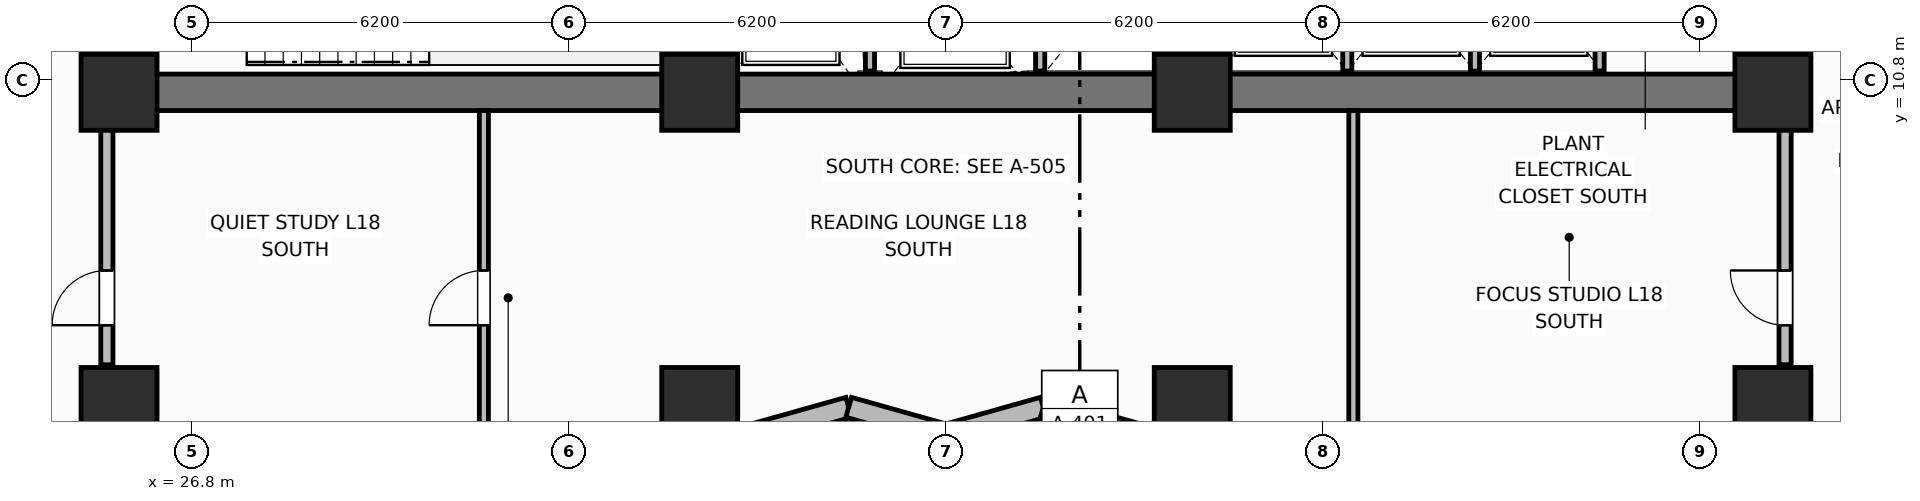
"""IFC4 building model, lengths in metres.
Left out: names, types, materials, properties, quantities, classifications, styles, units other than length and angle.
Written with IfcOpenShell. Run it as: python <this file> out.ifc"""

import sys

from ifc_helpers import new_model, si_unit, direction, frame, frame_2d, origin, origin_2d, place, context, subcontext, project, spatial, rectangle, extrude, element, fill, save


model = new_model("IFC4")
c1 = context("Model", 3, precision=1e-05, world=origin(), true_north=direction((0.0, 1.0)))
c2 = subcontext(c1, "Body", "Model", "MODEL_VIEW")
j1 = project(units=[si_unit("LENGTHUNIT", "METRE"), si_unit("PLANEANGLEUNIT", "RADIAN")], contexts=[c1])
p1 = place(None, origin())
s1 = spatial("IfcSite", under=j1, at=p1, CompositionType="ELEMENT")
p2 = place(p1, origin())
s2 = spatial("IfcBuilding", under=s1, at=p2, CompositionType="ELEMENT")
p3 = place(p2, frame((0.0, 0.0, 73.2)))
s3 = spatial("IfcBuildingStorey", under=s2, at=p3, CompositionType="ELEMENT", Elevation=73.2)
p4 = place(p3, frame((52.8, 10.6, 0.0), z_axis=(0.0, 0.0, 1.0), x_axis=(-1.0, 0.0, 0.0)))
e1 = element("IfcWall", 1, at=p4, inside=s3, PredefinedType="SHEAR", context=c2, shape_type="SweptSolid", body=[
    extrude(rectangle(XDim=27.2, YDim=0.6, at=frame_2d((13.6, 0.0))), origin(), (0.0, 0.0, 1.0), 3.7),
])
for number, where, z_axis, x_axis in (
    (2, (25.6, 10.9, 0.0), (0.0, 0.0, 1.0), (0.0, 1.0, 0.0)),
    (3, (52.8, 10.9, 0.0), (0.0, 0.0, 1.0), (0.0, 1.0, 0.0)),
):
    element("IfcWall", number, at=place(p3, frame(where, z_axis=z_axis, x_axis=x_axis)), inside=s3, PredefinedType="SHEAR", context=c2, shape_type="SweptSolid", body=[
        extrude(rectangle(XDim=5.6, YDim=0.6, at=frame_2d((2.8, 0.0))), origin(), (0.0, 0.0, 1.0), 3.7),
    ])
for number, where, z_axis, x_axis in (
    (4, (35.15, 10.9, 0.0), (0.0, 0.0, 1.0), (0.0, 1.0, 0.0)),
    (5, (43.25, 10.9, 0.0), (0.0, 0.0, 1.0), (0.0, 1.0, 0.0)),
):
    element("IfcWall", number, at=place(p3, frame(where, z_axis=z_axis, x_axis=x_axis)), inside=s3, PredefinedType="SHEAR", context=c2, shape_type="SweptSolid", body=[
        extrude(rectangle(XDim=5.6, YDim=0.4, at=frame_2d((2.8, 0.0))), origin(), (0.0, 0.0, 1.0), 3.7),
    ])
for number, where, z_axis, x_axis in (
    (6, (25.6, 10.6, 0.0), (0.0, 0.0, 1.0), (1.0, 0.0, 0.0)),
    (7, (35.15, 10.6, 0.0), (0.0, 0.0, 1.0), (1.0, 0.0, 0.0)),
    (8, (43.25, 10.6, 0.0), (0.0, 0.0, 1.0), (1.0, 0.0, 0.0)),
    (9, (52.8, 10.6, 0.0), (0.0, 0.0, 1.0), (1.0, 0.0, 0.0)),
    (10, (25.6, 5.45, 0.0), (0.0, 0.0, 1.0), (1.0, 0.0, 0.0)),
    (11, (35.15, 5.45, 0.0), (0.0, 0.0, 1.0), (1.0, 0.0, 0.0)),
    (12, (43.25, 5.45, 0.0), (0.0, 0.0, 1.0), (1.0, 0.0, 0.0)),
    (13, (52.8, 5.45, 0.0), (0.0, 0.0, 1.0), (1.0, 0.0, 0.0)),
):
    element("IfcColumn", number, at=place(p3, frame(where, z_axis=z_axis, x_axis=x_axis)), inside=s3, PredefinedType="COLUMN", context=c2, shape_type="SweptSolid", body=[
        extrude(rectangle(XDim=1.25, YDim=1.25, at=origin_2d()), origin(), (0.0, 0.0, 1.0), 3.7),
    ])
p5 = place(p3, frame((36.0, 4.97, 0.0), z_axis=(0.0, 0.0, 1.0), x_axis=(0.962662902433, 0.270703040766, 0.0)))
e14 = element("IfcWall", 14, at=p5, inside=s3, PredefinedType="SOLIDWALL", context=c2, shape_type="SweptSolid", body=[
    extrude(rectangle(XDim=1.662, YDim=0.34, at=frame_2d((0.831, 0.0))), origin(), (0.0, 0.0, 1.0), 2.66),
])
p6 = place(p3, frame((37.6, 5.42, 0.0), z_axis=(0.0, 0.0, 1.0), x_axis=(0.962652136636, -0.270741322725, 0.0)))
e15 = element("IfcWall", 15, at=p6, inside=s3, PredefinedType="SOLIDWALL", context=c2, shape_type="SweptSolid", body=[
    extrude(rectangle(XDim=1.662, YDim=0.34, at=frame_2d((0.831, 0.0))), origin(), (0.0, 0.0, 1.0), 2.66),
])
p7 = place(p3, frame((39.2, 4.97, 0.0), z_axis=(0.0, 0.0, 1.0), x_axis=(0.962662902433, 0.270703040766, 0.0)))
e16 = element("IfcWall", 16, at=p7, inside=s3, PredefinedType="SOLIDWALL", context=c2, shape_type="SweptSolid", body=[
    extrude(rectangle(XDim=1.662, YDim=0.34, at=frame_2d((0.831, 0.0))), origin(), (0.0, 0.0, 1.0), 2.66),
])
p8 = place(p3, frame((40.8, 5.42, 0.0), z_axis=(0.0, 0.0, 1.0), x_axis=(0.962652136636, -0.270741322725, 0.0)))
e17 = element("IfcWall", 17, at=p8, inside=s3, PredefinedType="SOLIDWALL", context=c2, shape_type="SweptSolid", body=[
    extrude(rectangle(XDim=1.662, YDim=0.34, at=frame_2d((0.831, 0.0))), origin(), (0.0, 0.0, 1.0), 2.66),
])
for number, where, z_axis, x_axis in (
    (18, (37.95, 10.95, 0.0), (0.0, 0.0, 1.0), (0.0, 1.0, 0.0)),
    (19, (40.75, 10.95, 0.0), (0.0, 0.0, 1.0), (0.0, 1.0, 0.0)),
):
    element("IfcWall", number, at=place(p3, frame(where, z_axis=z_axis, x_axis=x_axis)), inside=s3, PredefinedType="PARTITIONING", context=c2, shape_type="SweptSolid", body=[
        extrude(rectangle(XDim=2.75, YDim=0.15, at=frame_2d((1.375, 0.0))), origin(), (0.0, 0.0, 1.0), 2.49),
    ])
for number, where, z_axis, x_axis in (
    (20, (45.8, 10.95, 0.0), (0.0, 0.0, 1.0), (0.0, 1.0, 0.0)),
    (21, (47.9, 10.95, 0.0), (0.0, 0.0, 1.0), (0.0, 1.0, 0.0)),
    (22, (49.95, 10.95, 0.0), (0.0, 0.0, 1.0), (0.0, 1.0, 0.0)),
):
    element("IfcWall", number, at=place(p3, frame(where, z_axis=z_axis, x_axis=x_axis)), inside=s3, PredefinedType="PARTITIONING", context=c2, shape_type="SweptSolid", body=[
        extrude(rectangle(XDim=2.7, YDim=0.15, at=frame_2d((1.35, 0.0))), origin(), (0.0, 0.0, 1.0), 2.49),
    ])
p9 = place(p3, frame((31.6, 4.97, 0.0), z_axis=(0.0, 0.0, 1.0), x_axis=(0.0, 1.0, 0.0)))
e23 = element("IfcWall", 23, at=p9, inside=s3, PredefinedType="PARTITIONING", context=c2, shape_type="SweptSolid", body=[
    extrude(rectangle(XDim=5.33, YDim=0.15, at=frame_2d((2.665, 0.0))), origin(), (0.0, 0.0, 1.0), 2.49),
])
p10 = place(p9, frame((1.8, 0.0, 0.0)))
e24 = element("IfcOpeningElement", 24, at=p10, cuts=e23, PredefinedType="OPENING", context=c2, shape_type="SweptSolid", body=[
    extrude(rectangle(XDim=0.9, YDim=2.1, at=frame_2d((0.45, 1.05))), frame((0.0, 0.085, 0.0), z_axis=(0.0, -1.0, 0.0), x_axis=(1.0, 0.0, 0.0)), (0.0, 0.0, 1.0), 0.17),
])
p11 = place(p3, frame((45.9, 4.97, 0.0), z_axis=(0.0, 0.0, 1.0), x_axis=(0.0, 1.0, 0.0)))
e25 = element("IfcWall", 25, at=p11, inside=s3, PredefinedType="PARTITIONING", context=c2, shape_type="SweptSolid", body=[
    extrude(rectangle(XDim=5.33, YDim=0.15, at=frame_2d((2.665, 0.0))), origin(), (0.0, 0.0, 1.0), 2.49),
])
p12 = place(p3, frame((25.4, 6.12, 0.0), z_axis=(0.0, 0.0, 1.0), x_axis=(0.0, 1.0, 0.0)))
e26 = element("IfcWall", 26, at=p12, inside=s3, PredefinedType="PARTITIONING", context=c2, shape_type="SweptSolid", body=[
    extrude(rectangle(XDim=4.18, YDim=0.2, at=frame_2d((2.09, 0.0))), origin(), (0.0, 0.0, 1.0), 2.49),
])
p13 = place(p12, frame((0.65, 0.0, 0.0)))
e27 = element("IfcOpeningElement", 27, at=p13, cuts=e26, PredefinedType="OPENING", context=c2, shape_type="SweptSolid", body=[
    extrude(rectangle(XDim=0.9, YDim=2.1, at=frame_2d((0.45, 1.05))), frame((0.0, 0.11, 0.0), z_axis=(0.0, -1.0, 0.0), x_axis=(1.0, 0.0, 0.0)), (0.0, 0.0, 1.0), 0.22),
])
p14 = place(p3, frame((53.0, 6.12, 0.0), z_axis=(0.0, 0.0, 1.0), x_axis=(0.0, 1.0, 0.0)))
e28 = element("IfcWall", 28, at=p14, inside=s3, PredefinedType="PARTITIONING", context=c2, shape_type="SweptSolid", body=[
    extrude(rectangle(XDim=4.18, YDim=0.2, at=frame_2d((2.09, 0.0))), origin(), (0.0, 0.0, 1.0), 2.49),
])
p15 = place(p14, frame((0.65, 0.0, 0.0)))
e29 = element("IfcOpeningElement", 29, at=p15, cuts=e28, PredefinedType="OPENING", context=c2, shape_type="SweptSolid", body=[
    extrude(rectangle(XDim=0.9, YDim=2.1, at=frame_2d((0.45, 1.05))), frame((0.0, 0.11, 0.0), z_axis=(0.0, -1.0, 0.0), x_axis=(1.0, 0.0, 0.0)), (0.0, 0.0, 1.0), 0.22),
])
p16 = place(p10, origin())
e30 = element("IfcDoor", 30, at=p16, inside=s3, OperationType="SINGLE_SWING_LEFT", PredefinedType="DOOR", context=c2, shape_type="SweptSolid", body=[
    extrude(rectangle(XDim=0.9, YDim=2.1, at=frame_2d((0.45, 1.05))), frame((0.0, 0.025, 0.0), z_axis=(0.0, -1.0, 0.0), x_axis=(1.0, 0.0, 0.0)), (0.0, 0.0, 1.0), 0.05),
])
fill(e24, e30)
p17 = place(p13, origin())
e31 = element("IfcDoor", 31, at=p17, inside=s3, OperationType="SINGLE_SWING_LEFT", PredefinedType="DOOR", context=c2, shape_type="SweptSolid", body=[
    extrude(rectangle(XDim=0.9, YDim=2.1, at=frame_2d((0.45, 1.05))), frame((0.0, 0.025, 0.0), z_axis=(0.0, -1.0, 0.0), x_axis=(1.0, 0.0, 0.0)), (0.0, 0.0, 1.0), 0.05),
])
fill(e27, e31)
p18 = place(p15, origin())
e32 = element("IfcDoor", 32, at=p18, inside=s3, OperationType="SINGLE_SWING_RIGHT", PredefinedType="DOOR", context=c2, shape_type="SweptSolid", body=[
    extrude(rectangle(XDim=0.9, YDim=2.1, at=frame_2d((0.45, 1.05))), frame((0.0, 0.025, 0.0), z_axis=(0.0, -1.0, 0.0), x_axis=(1.0, 0.0, 0.0)), (0.0, 0.0, 1.0), 0.05),
])
fill(e29, e32)
save(model, sys.argv[1])
